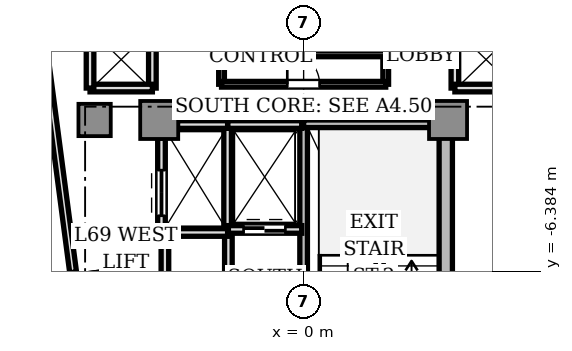
"""IFC4 building model, lengths in metres.
Left out: names, types, materials, properties, quantities, classifications, styles, units other than length and angle.
Written with IfcOpenShell. Run it as: python <this file> out.ifc"""

import sys

from ifc_helpers import new_model, si_unit, direction, frame, frame_2d, origin, origin_2d, place, context, subcontext, project, spatial, rectangle, extrude, source, transform, mapped, element, fill, save


model = new_model("IFC4")
c1 = context("Model", 3, precision=1e-05, world=origin(), true_north=direction((0.0, 1.0)))
c2 = subcontext(c1, "Body", "Model", "MODEL_VIEW")
j1 = project(units=[si_unit("LENGTHUNIT", "METRE"), si_unit("PLANEANGLEUNIT", "RADIAN")], contexts=[c1])
p1 = place(None, origin())
s1 = spatial("IfcSite", under=j1, at=p1, CompositionType="ELEMENT")
p2 = place(p1, origin())
s2 = spatial("IfcBuilding", under=s1, at=p2, CompositionType="ELEMENT")
p3 = place(p2, frame((0.0, 0.0, 247.85)))
s3 = spatial("IfcBuildingStorey", under=s2, at=p3, CompositionType="ELEMENT", Elevation=247.85)
p4 = place(p3, frame((3.74, -9.75, 0.0), z_axis=(0.0, 0.0, 1.0), x_axis=(0.0, 1.0, 0.0)))
e1 = element("IfcWall", 1, at=p4, inside=s3, PredefinedType="SHEAR", context=c2, shape_type="SweptSolid", body=[
    extrude(rectangle(XDim=6.9, YDim=0.35, at=frame_2d((3.45, 0.0))), origin(), (0.0, 0.0, 1.0), 3.11),
])
m1 = source(origin(), c2, "Body", "SweptSolid", [
    extrude(rectangle(XDim=1.0, YDim=1.0, at=origin_2d()), origin(), (0.0, 0.0, 1.0), 3.11),
])
for number, where, z_axis, x_axis in (
    (2, (-3.8, -2.4, 0.0), (0.0, 0.0, 1.0), (1.0, 0.0, 0.0)),
    (3, (3.8, -2.4, 0.0), (0.0, 0.0, 1.0), (1.0, 0.0, 0.0)),
):
    element("IfcColumn", number, at=place(p3, frame(where, z_axis=z_axis, x_axis=x_axis)), inside=s3, PredefinedType="COLUMN", context=c2, shape_type="MappedRepresentation", body=[
        mapped(m1, transform((0.0, 0.0, 0.0), scale=1.0)),
    ])
m2 = source(origin(), c2, "Body", "SweptSolid", [
    extrude(rectangle(XDim=0.85, YDim=0.85, at=origin_2d()), origin(), (0.0, 0.0, 1.0), 3.11),
])
p5 = place(p3, frame((-5.5, -2.4, 0.0), z_axis=(0.0, 0.0, 1.0), x_axis=(1.0, 0.0, 0.0)))
e4 = element("IfcColumn", 4, at=p5, inside=s3, PredefinedType="COLUMN", context=c2, shape_type="MappedRepresentation", body=[
    mapped(m2, transform((0.0, 0.0, 0.0), scale=1.0)),
])
p6 = place(p3, frame((-4.832, -6.298, 0.0), z_axis=(0.0, 0.0, 1.0), x_axis=(0.130475563272, -0.991451525486, 0.0)))
e5 = element("IfcWall", 5, at=p6, inside=s3, PredefinedType="STANDARD", context=c2, shape_type="SweptSolid", body=[
    extrude(rectangle(XDim=2.7, YDim=0.22, at=frame_2d((1.35, 0.0))), origin(), (0.0, 0.0, 1.0), 3.11),
])
p7 = place(p6, frame((1.4, 0.0, 0.0)))
e6 = element("IfcOpeningElement", 6, at=p7, cuts=e5, PredefinedType="OPENING", context=c2, shape_type="SweptSolid", body=[
    extrude(rectangle(XDim=1.0, YDim=2.2, at=frame_2d((0.5, 1.1))), frame((0.0, 0.12, 0.0), z_axis=(0.0, -1.0, 0.0), x_axis=(1.0, 0.0, 0.0)), (0.0, 0.0, 1.0), 0.24),
])
p8 = place(p3, frame((0.0, -10.18, 0.0), z_axis=(0.0, 0.0, 1.0), x_axis=(0.0, 1.0, 0.0)))
e7 = element("IfcWall", 7, at=p8, inside=s3, PredefinedType="SOLIDWALL", context=c2, shape_type="SweptSolid", body=[
    extrude(rectangle(XDim=7.68, YDim=0.2, at=frame_2d((3.84, 0.0))), origin(), (0.0, 0.0, 1.0), 3.11),
])
p9 = place(p8, frame((0.28, 0.0, 0.0)))
e8 = element("IfcOpeningElement", 8, at=p9, cuts=e7, PredefinedType="OPENING", context=c2, shape_type="SweptSolid", body=[
    extrude(rectangle(XDim=1.1, YDim=2.15, at=frame_2d((0.55, 1.075))), frame((0.0, 0.11, 0.0), z_axis=(0.0, -1.0, 0.0), x_axis=(1.0, 0.0, 0.0)), (0.0, 0.0, 1.0), 0.22),
])
p10 = place(p3, frame((0.0, -2.5, 0.0), z_axis=(0.0, 0.0, 1.0), x_axis=(1.0, 0.0, 0.0)))
e9 = element("IfcWall", 9, at=p10, inside=s3, PredefinedType="SOLIDWALL", context=c2, shape_type="SweptSolid", body=[
    extrude(rectangle(XDim=3.72, YDim=0.2, at=frame_2d((1.86, 0.0))), origin(), (0.0, 0.0, 1.0), 3.11),
])
p11 = place(p3, frame((-1.98, -9.98, 0.0), z_axis=(0.0, 0.0, 1.0), x_axis=(0.0, 1.0, 0.0)))
e10 = element("IfcWall", 10, at=p11, inside=s3, PredefinedType="SOLIDWALL", context=c2, shape_type="SweptSolid", body=[
    extrude(rectangle(XDim=4.66, YDim=0.2, at=frame_2d((2.33, 0.0))), origin(), (0.0, 0.0, 1.0), 2.66),
])
p12 = place(p11, frame((0.2, 0.0, 0.0)))
e11 = element("IfcOpeningElement", 11, at=p12, cuts=e10, PredefinedType="OPENING", context=c2, shape_type="SweptSolid", body=[
    extrude(rectangle(XDim=0.85, YDim=2.1, at=frame_2d((0.425, 1.05))), frame((0.0, 0.11, 0.0), z_axis=(0.0, -1.0, 0.0), x_axis=(1.0, 0.0, 0.0)), (0.0, 0.0, 1.0), 0.22),
])
p13 = place(p3, frame((-2.0, -5.28, 0.0), z_axis=(0.0, 0.0, 1.0), x_axis=(0.0, 1.0, 0.0)))
e12 = element("IfcWall", 12, at=p13, inside=s3, PredefinedType="SOLIDWALL", context=c2, shape_type="SweptSolid", body=[
    extrude(rectangle(XDim=2.78, YDim=0.2, at=frame_2d((1.39, 0.0))), origin(), (0.0, 0.0, 1.0), 2.66),
])
p14 = place(p3, frame((-2.0, -2.52, 0.0), z_axis=(0.0, 0.0, 1.0), x_axis=(1.0, 0.0, 0.0)))
e13 = element("IfcWall", 13, at=p14, inside=s3, PredefinedType="SOLIDWALL", context=c2, shape_type="SweptSolid", body=[
    extrude(rectangle(XDim=1.95, YDim=0.2, at=frame_2d((0.975, 0.0))), origin(), (0.0, 0.0, 1.0), 2.66),
])
p15 = place(p3, frame((-1.98, -5.28, 0.0), z_axis=(0.0, 0.0, 1.0), x_axis=(1.0, 0.0, 0.0)))
e14 = element("IfcWall", 14, at=p15, inside=s3, PredefinedType="SOLIDWALL", context=c2, shape_type="SweptSolid", body=[
    extrude(rectangle(XDim=1.93, YDim=0.2, at=frame_2d((0.965, 0.0))), origin(), (0.0, 0.0, 1.0), 2.66),
])
p16 = place(p15, frame((0.4, 0.0, 0.0)))
e15 = element("IfcOpeningElement", 15, at=p16, cuts=e14, PredefinedType="OPENING", context=c2, shape_type="SweptSolid", body=[
    extrude(rectangle(XDim=1.1, YDim=2.2, at=frame_2d((0.55, 1.1))), frame((0.0, 0.11, 0.0), z_axis=(0.0, -1.0, 0.0), x_axis=(1.0, 0.0, 0.0)), (0.0, 0.0, 1.0), 0.22),
])
p17 = place(p3, frame((-3.32, -2.52, 0.0), z_axis=(0.0, 0.0, 1.0), x_axis=(1.0, 0.0, 0.0)))
e16 = element("IfcWall", 16, at=p17, inside=s3, PredefinedType="SOLIDWALL", context=c2, shape_type="SweptSolid", body=[
    extrude(rectangle(XDim=1.32, YDim=0.2, at=frame_2d((0.66, 0.0))), origin(), (0.0, 0.0, 1.0), 2.66),
])
p18 = place(p3, frame((-3.74, -5.36, 0.0), z_axis=(0.0, 0.0, 1.0), x_axis=(1.0, 0.0, 0.0)))
e17 = element("IfcWall", 17, at=p18, inside=s3, PredefinedType="SOLIDWALL", context=c2, shape_type="SweptSolid", body=[
    extrude(rectangle(XDim=1.74, YDim=0.2, at=frame_2d((0.87, 0.0))), origin(), (0.0, 0.0, 1.0), 2.66),
])
p19 = place(p3, frame((-3.74, -5.36, 0.0), z_axis=(0.0, 0.0, 1.0), x_axis=(0.0, 1.0, 0.0)))
e18 = element("IfcWall", 18, at=p19, inside=s3, PredefinedType="SOLIDWALL", context=c2, shape_type="SweptSolid", body=[
    extrude(rectangle(XDim=2.48, YDim=0.2, at=frame_2d((1.24, 0.0))), origin(), (0.0, 0.0, 1.0), 2.66),
])
p20 = place(p19, frame((0.44, 0.0, 0.0)))
e19 = element("IfcOpeningElement", 19, at=p20, cuts=e18, PredefinedType="OPENING", context=c2, shape_type="SweptSolid", body=[
    extrude(rectangle(XDim=1.2, YDim=2.2, at=frame_2d((0.6, 1.1))), frame((0.0, 0.11, 0.0), z_axis=(0.0, -1.0, 0.0), x_axis=(1.0, 0.0, 0.0)), (0.0, 0.0, 1.0), 0.22),
])
p21 = place(p3, frame((3.98, -1.56, 0.0), z_axis=(0.0, 0.0, 1.0), x_axis=(0.0, 1.0, 0.0)))
e20 = element("IfcWall", 20, at=p21, inside=s3, PredefinedType="SOLIDWALL", context=c2, shape_type="SweptSolid", body=[
    extrude(rectangle(XDim=3.12, YDim=0.2, at=frame_2d((1.56, 0.0))), origin(), (0.0, 0.0, 1.0), 2.33),
])
p22 = place(p3, frame((3.98, -1.56, 0.0), z_axis=(0.0, 0.0, 1.0), x_axis=(1.0, 0.0, 0.0)))
e21 = element("IfcWall", 21, at=p22, inside=s3, PredefinedType="SOLIDWALL", context=c2, shape_type="SweptSolid", body=[
    extrude(rectangle(XDim=1.64, YDim=0.2, at=frame_2d((0.82, 0.0))), origin(), (0.0, 0.0, 1.0), 2.66),
])
p23 = place(p3, frame((-3.98, -1.56, 0.0), z_axis=(0.0, 0.0, 1.0), x_axis=(0.0, 1.0, 0.0)))
e22 = element("IfcWall", 22, at=p23, inside=s3, PredefinedType="SOLIDWALL", context=c2, shape_type="SweptSolid", body=[
    extrude(rectangle(XDim=3.12, YDim=0.2, at=frame_2d((1.56, 0.0))), origin(), (0.0, 0.0, 1.0), 2.33),
])
p24 = place(p3, frame((-5.62, -1.56, 0.0), z_axis=(0.0, 0.0, 1.0), x_axis=(1.0, 0.0, 0.0)))
e23 = element("IfcWall", 23, at=p24, inside=s3, PredefinedType="SOLIDWALL", context=c2, shape_type="SweptSolid", body=[
    extrude(rectangle(XDim=1.64, YDim=0.2, at=frame_2d((0.82, 0.0))), origin(), (0.0, 0.0, 1.0), 2.66),
])
p25 = place(p3, frame((-5.62, -1.56, 0.0), z_axis=(0.0, 0.0, 1.0), x_axis=(0.0, 1.0, 0.0)))
e24 = element("IfcWall", 24, at=p25, inside=s3, PredefinedType="SOLIDWALL", context=c2, shape_type="SweptSolid", body=[
    extrude(rectangle(XDim=1.56, YDim=0.2, at=frame_2d((0.78, 0.0))), origin(), (0.0, 0.0, 1.0), 2.66),
])
p26 = place(p3, frame((-3.65, -8.81, 0.0), z_axis=(0.0, 0.0, 1.0), x_axis=(0.0, 1.0, 0.0)))
e25 = element("IfcWall", 25, at=p26, inside=s3, PredefinedType="SOLIDWALL", context=c2, shape_type="SweptSolid", body=[
    extrude(rectangle(XDim=3.43, YDim=0.2, at=frame_2d((1.715, 0.0))), origin(), (0.0, 0.0, 1.0), 2.66),
])
p27 = place(p26, frame((1.2, 0.0, 0.0)))
e26 = element("IfcOpeningElement", 26, at=p27, cuts=e25, PredefinedType="OPENING", context=c2, shape_type="SweptSolid", body=[
    extrude(rectangle(XDim=0.95, YDim=2.15, at=frame_2d((0.475, 1.075))), frame((0.0, 0.11, 0.0), z_axis=(0.0, -1.0, 0.0), x_axis=(1.0, 0.0, 0.0)), (0.0, 0.0, 1.0), 0.22),
])
p28 = place(p3, frame((2.16, -1.46, 0.0), z_axis=(0.0, 0.0, 1.0), x_axis=(0.0, 1.0, 0.0)))
e27 = element("IfcWall", 27, at=p28, inside=s3, PredefinedType="PARTITIONING", context=c2, shape_type="SweptSolid", body=[
    extrude(rectangle(XDim=2.92, YDim=0.15, at=frame_2d((1.46, 0.0))), origin(), (0.0, 0.0, 1.0), 2.66),
])
p29 = place(p28, frame((1.035, 0.0, 0.0)))
e28 = element("IfcOpeningElement", 28, at=p29, cuts=e27, PredefinedType="OPENING", context=c2, shape_type="SweptSolid", body=[
    extrude(rectangle(XDim=0.85, YDim=2.1, at=frame_2d((0.425, 1.05))), frame((0.0, 0.085, 0.0), z_axis=(0.0, -1.0, 0.0), x_axis=(1.0, 0.0, 0.0)), (0.0, 0.0, 1.0), 0.17),
])
p30 = place(p3, frame((-2.16, -1.46, 0.0), z_axis=(0.0, 0.0, 1.0), x_axis=(0.0, 1.0, 0.0)))
e29 = element("IfcWall", 29, at=p30, inside=s3, PredefinedType="PARTITIONING", context=c2, shape_type="SweptSolid", body=[
    extrude(rectangle(XDim=2.92, YDim=0.15, at=frame_2d((1.46, 0.0))), origin(), (0.0, 0.0, 1.0), 2.66),
])
p31 = place(p3, frame((-2.16, -1.46, 0.0), z_axis=(0.0, 0.0, 1.0), x_axis=(1.0, 0.0, 0.0)))
e30 = element("IfcWall", 30, at=p31, inside=s3, PredefinedType="PARTITIONING", context=c2, shape_type="SweptSolid", body=[
    extrude(rectangle(XDim=4.32, YDim=0.15, at=frame_2d((2.16, 0.0))), origin(), (0.0, 0.0, 1.0), 2.66),
])
p32 = place(p31, frame((1.73, 0.0, 0.0)))
e31 = element("IfcOpeningElement", 31, at=p32, cuts=e30, PredefinedType="OPENING", context=c2, shape_type="SweptSolid", body=[
    extrude(rectangle(XDim=0.85, YDim=2.1, at=frame_2d((0.425, 1.05))), frame((0.0, 0.085, 0.0), z_axis=(0.0, -1.0, 0.0), x_axis=(1.0, 0.0, 0.0)), (0.0, 0.0, 1.0), 0.17),
])
p33 = place(p3, frame((-2.16, -0.66, 0.0), z_axis=(0.0, 0.0, 1.0), x_axis=(1.0, 0.0, 0.0)))
e32 = element("IfcWall", 32, at=p33, inside=s3, PredefinedType="PARTITIONING", context=c2, shape_type="SweptSolid", body=[
    extrude(rectangle(XDim=4.32, YDim=0.15, at=frame_2d((2.16, 0.0))), origin(), (0.0, 0.0, 1.0), 2.66),
])
p34 = place(p3, frame((-7.23, 2.44, 0.0), z_axis=(0.0, 0.0, 1.0), x_axis=(0.130549321022, -0.991441816135, 0.0)))
e33 = element("IfcWall", 33, at=p34, inside=s3, PredefinedType="PARTITIONING", context=c2, shape_type="SweptSolid", body=[
    extrude(rectangle(XDim=8.926, YDim=0.18, at=frame_2d((4.463, 0.0))), origin(), (0.0, 0.0, 1.0), 2.66),
])
m3 = source(origin(), c2, "Body", "SweptSolid", [
    extrude(rectangle(XDim=1.1, YDim=0.05, at=origin_2d()), origin(), (0.0, 0.0, 1.0), 2.2),
])
p35 = place(p16, frame((0.55, 0.0, 0.0)))
e34 = element("IfcDoor", 34, at=p35, inside=s3, OperationType="DOUBLE_DOOR_SLIDING", PredefinedType="DOOR", context=c2, shape_type="MappedRepresentation", body=[
    mapped(m3, transform((0.0, 0.0, 0.0), scale=1.0)),
])
fill(e15, e34)
m4 = source(origin(), c2, "Body", "SweptSolid", [
    extrude(rectangle(XDim=1.2, YDim=0.05, at=origin_2d()), origin(), (0.0, 0.0, 1.0), 2.2),
])
p36 = place(p20, frame((0.6, 0.0, 0.0)))
e35 = element("IfcDoor", 35, at=p36, inside=s3, OperationType="DOUBLE_DOOR_SLIDING", PredefinedType="DOOR", context=c2, shape_type="MappedRepresentation", body=[
    mapped(m4, transform((0.0, 0.0, 0.0), scale=1.0)),
])
fill(e19, e35)
m5 = source(origin(), c2, "Body", "SweptSolid", [
    extrude(rectangle(XDim=0.85, YDim=0.05, at=origin_2d()), origin(), (0.0, 0.0, 1.0), 2.1),
])
p37 = place(p32, frame((0.425, 0.0, 0.0)))
e36 = element("IfcDoor", 36, at=p37, inside=s3, OperationType="SINGLE_SWING_LEFT", PredefinedType="DOOR", context=c2, shape_type="MappedRepresentation", body=[
    mapped(m5, transform((0.0, 0.0, 0.0), scale=1.0)),
])
fill(e31, e36)
save(model, sys.argv[1])
